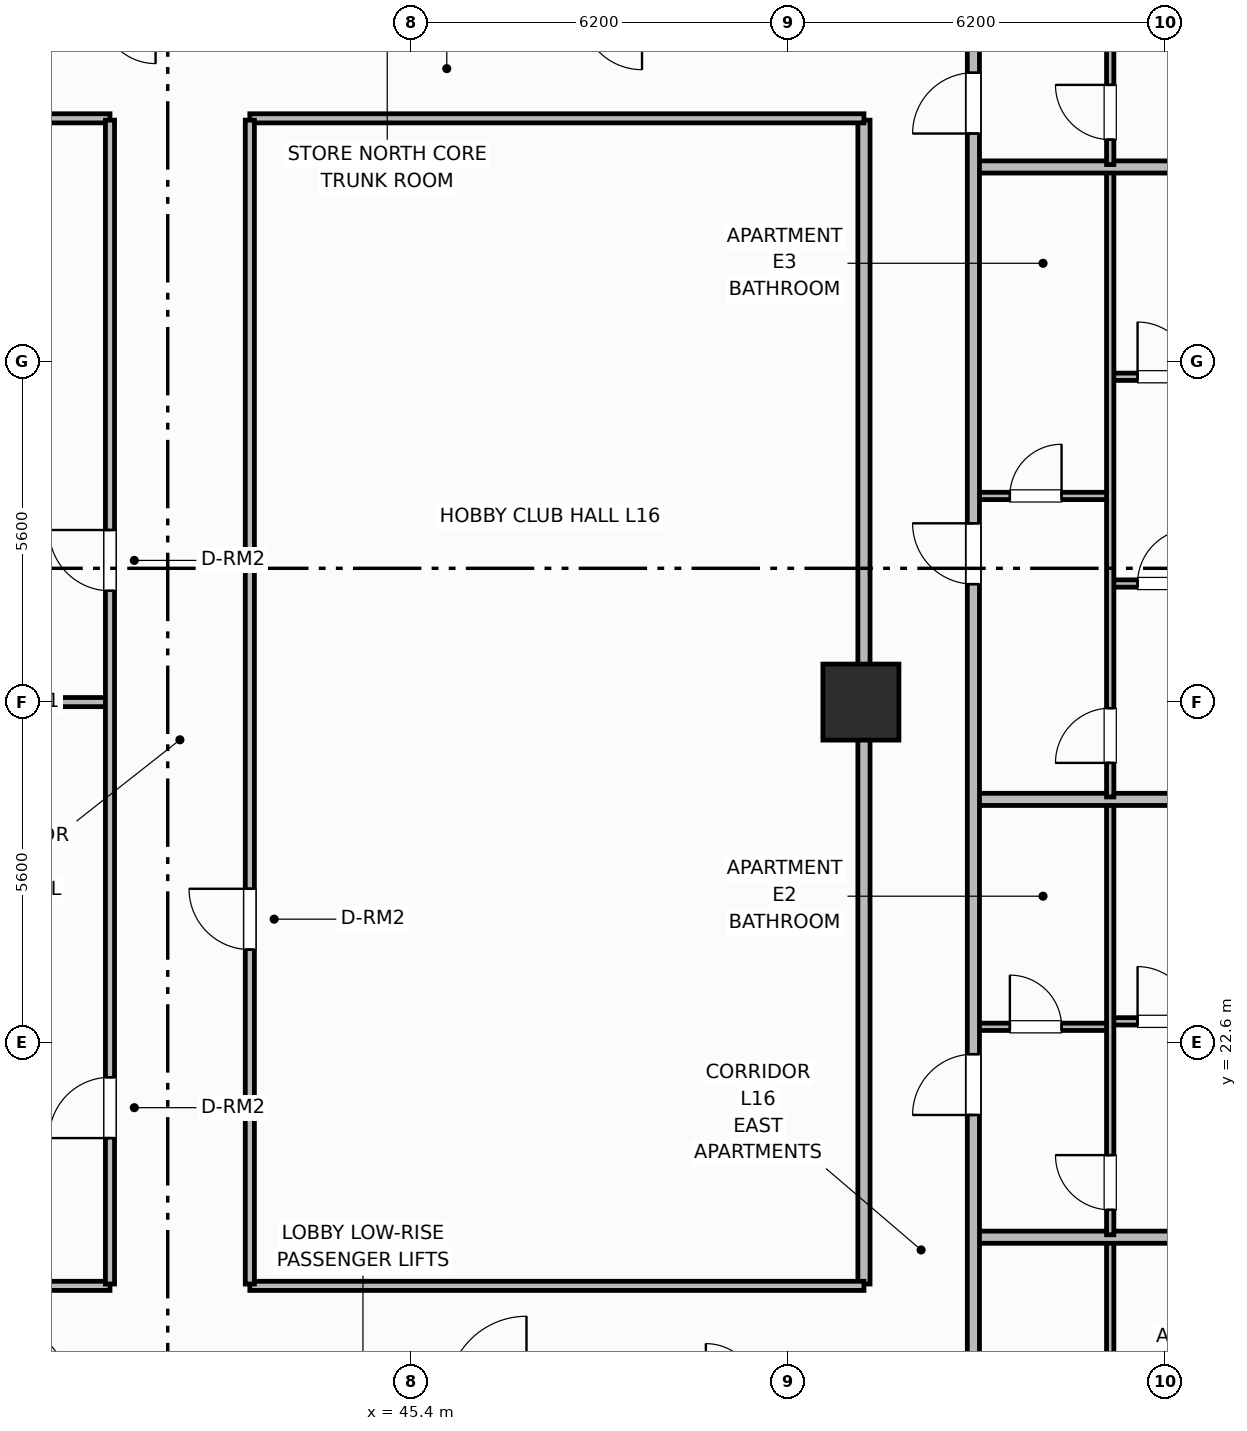
"""IFC4 building model, lengths in metres.
Left out: names, types, materials, properties, quantities, classifications, styles, units other than length and angle.
Written with IfcOpenShell. Run it as: python <this file> out.ifc"""

import sys

from ifc_helpers import new_model, si_unit, direction, frame, frame_2d, origin, origin_2d, place, context, subcontext, project, spatial, rectangle, extrude, element, fill, save


model = new_model("IFC4")
c1 = context("Model", 3, precision=1e-05, world=origin(), true_north=direction((0.0, 1.0)))
c2 = subcontext(c1, "Body", "Model", "MODEL_VIEW")
j1 = project(units=[si_unit("LENGTHUNIT", "METRE"), si_unit("PLANEANGLEUNIT", "RADIAN")], contexts=[c1])
p1 = place(None, origin())
s1 = spatial("IfcSite", under=j1, at=p1, CompositionType="ELEMENT")
p2 = place(p1, origin())
s2 = spatial("IfcBuilding", under=s1, at=p2, CompositionType="ELEMENT")
p3 = place(p2, frame((0.0, 0.0, 65.8)))
s3 = spatial("IfcBuildingStorey", under=s2, at=p3, CompositionType="ELEMENT", Elevation=65.8)
p4 = place(p3, frame((52.8, 28.2, 0.0), z_axis=(0.0, 0.0, 1.0), x_axis=(1.0, 0.0, 0.0)))
e1 = element("IfcColumn", 1, at=p4, inside=s3, PredefinedType="COLUMN", context=c2, shape_type="SweptSolid", body=[
    extrude(rectangle(XDim=1.25, YDim=1.25, at=origin_2d()), origin(), (0.0, 0.0, 1.0), 3.7),
])
p5 = place(p3, frame((52.85, 18.63, 0.0), z_axis=(0.0, 0.0, 1.0), x_axis=(0.0, 1.0, 0.0)))
e2 = element("IfcWall", 2, at=p5, inside=s3, PredefinedType="PARTITIONING", context=c2, shape_type="SweptSolid", body=[
    extrude(rectangle(XDim=19.14, YDim=0.2, at=frame_2d((9.57, 0.0))), origin(), (0.0, 0.0, 1.0), 2.53),
])
p6 = place(p3, frame((25.55, 18.6, 0.0), z_axis=(0.0, 0.0, 1.0), x_axis=(1.0, 0.0, 0.0)))
e3 = element("IfcWall", 3, at=p6, inside=s3, PredefinedType="PARTITIONING", context=c2, shape_type="SweptSolid", body=[
    extrude(rectangle(XDim=14.9, YDim=0.15, at=frame_2d((7.45, 0.0))), origin(), (0.0, 0.0, 1.0), 2.53),
])
p7 = place(p3, frame((42.75, 18.6, 0.0), z_axis=(0.0, 0.0, 1.0), x_axis=(1.0, 0.0, 0.0)))
e4 = element("IfcWall", 4, at=p7, inside=s3, PredefinedType="PARTITIONING", context=c2, shape_type="SweptSolid", body=[
    extrude(rectangle(XDim=10.1, YDim=0.15, at=frame_2d((5.05, 0.0))), origin(), (0.0, 0.0, 1.0), 2.53),
])
p8 = place(p3, frame((25.55, 37.8, 0.0), z_axis=(0.0, 0.0, 1.0), x_axis=(1.0, 0.0, 0.0)))
e5 = element("IfcWall", 5, at=p8, inside=s3, PredefinedType="PARTITIONING", context=c2, shape_type="SweptSolid", body=[
    extrude(rectangle(XDim=14.9, YDim=0.15, at=frame_2d((7.45, 0.0))), origin(), (0.0, 0.0, 1.0), 2.53),
])
p9 = place(p3, frame((42.75, 37.8, 0.0), z_axis=(0.0, 0.0, 1.0), x_axis=(1.0, 0.0, 0.0)))
e6 = element("IfcWall", 6, at=p9, inside=s3, PredefinedType="PARTITIONING", context=c2, shape_type="SweptSolid", body=[
    extrude(rectangle(XDim=10.1, YDim=0.15, at=frame_2d((5.05, 0.0))), origin(), (0.0, 0.0, 1.0), 2.53),
])
p10 = place(p3, frame((25.6, 28.2, 0.0), z_axis=(0.0, 0.0, 1.0), x_axis=(1.0, 0.0, 0.0)))
e7 = element("IfcWall", 7, at=p10, inside=s3, PredefinedType="PARTITIONING", context=c2, shape_type="SweptSolid", body=[
    extrude(rectangle(XDim=14.87, YDim=0.15, at=frame_2d((7.435, 0.0))), origin(), (0.0, 0.0, 1.0), 2.53),
])
p11 = place(p3, frame((40.45, 18.63, 0.0), z_axis=(0.0, 0.0, 1.0), x_axis=(0.0, 1.0, 0.0)))
e8 = element("IfcWall", 8, at=p11, inside=s3, PredefinedType="PARTITIONING", context=c2, shape_type="SweptSolid", body=[
    extrude(rectangle(XDim=19.14, YDim=0.15, at=frame_2d((9.57, 0.0))), origin(), (0.0, 0.0, 1.0), 2.53),
])
p12 = place(p11, frame((2.4, 0.0, 0.0)))
e9 = element("IfcOpeningElement", 9, at=p12, cuts=e8, PredefinedType="OPENING", context=c2, shape_type="SweptSolid", body=[
    extrude(rectangle(XDim=1.0, YDim=2.15, at=frame_2d((0.5, 1.075))), frame((0.0, 0.085, 0.0), z_axis=(0.0, -1.0, 0.0), x_axis=(1.0, 0.0, 0.0)), (0.0, 0.0, 1.0), 0.17),
])
p13 = place(p11, frame((11.4, 0.0, 0.0)))
e10 = element("IfcOpeningElement", 10, at=p13, cuts=e8, PredefinedType="OPENING", context=c2, shape_type="SweptSolid", body=[
    extrude(rectangle(XDim=1.0, YDim=2.15, at=frame_2d((0.5, 1.075))), frame((0.0, 0.085, 0.0), z_axis=(0.0, -1.0, 0.0), x_axis=(1.0, 0.0, 0.0)), (0.0, 0.0, 1.0), 0.17),
])
p14 = place(p3, frame((42.75, 18.63, 0.0), z_axis=(0.0, 0.0, 1.0), x_axis=(0.0, 1.0, 0.0)))
e11 = element("IfcWall", 11, at=p14, inside=s3, PredefinedType="PARTITIONING", context=c2, shape_type="SweptSolid", body=[
    extrude(rectangle(XDim=19.14, YDim=0.15, at=frame_2d((9.57, 0.0))), origin(), (0.0, 0.0, 1.0), 2.53),
])
p15 = place(p14, frame((5.5, 0.0, 0.0)))
e12 = element("IfcOpeningElement", 12, at=p15, cuts=e11, PredefinedType="OPENING", context=c2, shape_type="SweptSolid", body=[
    extrude(rectangle(XDim=1.0, YDim=2.15, at=frame_2d((0.5, 1.075))), frame((0.0, 0.085, 0.0), z_axis=(0.0, -1.0, 0.0), x_axis=(1.0, 0.0, 0.0)), (0.0, 0.0, 1.0), 0.17),
])
p16 = place(p3, frame((56.9, 10.64, 0.0), z_axis=(0.0, 0.0, 1.0), x_axis=(0.0, 1.0, 0.0)))
e13 = element("IfcWall", 13, at=p16, inside=s3, PredefinedType="PARTITIONING", context=c2, shape_type="SweptSolid", body=[
    extrude(rectangle(XDim=8.72, YDim=0.12, at=frame_2d((4.36, 0.0))), origin(), (0.0, 0.0, 1.0), 2.53),
])
p17 = place(p16, frame((0.41, 0.0, 0.0)))
e14 = element("IfcOpeningElement", 14, at=p17, cuts=e13, PredefinedType="OPENING", context=c2, shape_type="SweptSolid", body=[
    extrude(rectangle(XDim=0.9, YDim=2.1, at=frame_2d((0.45, 1.05))), frame((0.0, 0.07, 0.0), z_axis=(0.0, -1.0, 0.0), x_axis=(1.0, 0.0, 0.0)), (0.0, 0.0, 1.0), 0.14),
])
p18 = place(p3, frame((54.65, 19.4, 0.0), z_axis=(0.0, 0.0, 1.0), x_axis=(1.0, 0.0, 0.0)))
e15 = element("IfcWall", 15, at=p18, inside=s3, PredefinedType="PARTITIONING", context=c2, shape_type="SweptSolid", body=[
    extrude(rectangle(XDim=9.18, YDim=0.2, at=frame_2d((4.59, 0.0))), origin(), (0.0, 0.0, 1.0), 2.53),
])
p19 = place(p3, frame((54.65, 22.86, 0.0), z_axis=(0.0, 0.0, 1.0), x_axis=(1.0, 0.0, 0.0)))
e16 = element("IfcWall", 16, at=p19, inside=s3, PredefinedType="PARTITIONING", context=c2, shape_type="SweptSolid", body=[
    extrude(rectangle(XDim=2.25, YDim=0.12, at=frame_2d((1.125, 0.0))), origin(), (0.0, 0.0, 1.0), 2.53),
])
p20 = place(p19, frame((0.6, 0.0, 0.0)))
e17 = element("IfcOpeningElement", 17, at=p20, cuts=e16, PredefinedType="OPENING", context=c2, shape_type="SweptSolid", body=[
    extrude(rectangle(XDim=0.85, YDim=2.1, at=frame_2d((0.425, 1.05))), frame((0.0, 0.07, 0.0), z_axis=(0.0, -1.0, 0.0), x_axis=(1.0, 0.0, 0.0)), (0.0, 0.0, 1.0), 0.14),
])
p21 = place(p3, frame((56.9, 22.95, 0.0), z_axis=(0.0, 0.0, 1.0), x_axis=(1.0, 0.0, 0.0)))
e18 = element("IfcWall", 18, at=p21, inside=s3, PredefinedType="PARTITIONING", context=c2, shape_type="SweptSolid", body=[
    extrude(rectangle(XDim=6.93, YDim=0.12, at=frame_2d((3.465, 0.0))), origin(), (0.0, 0.0, 1.0), 2.53),
])
p22 = place(p21, frame((0.45, 0.0, 0.0)))
e19 = element("IfcOpeningElement", 19, at=p22, cuts=e18, PredefinedType="OPENING", context=c2, shape_type="SweptSolid", body=[
    extrude(rectangle(XDim=0.9, YDim=2.1, at=frame_2d((0.45, 1.05))), frame((0.0, 0.07, 0.0), z_axis=(0.0, -1.0, 0.0), x_axis=(1.0, 0.0, 0.0)), (0.0, 0.0, 1.0), 0.14),
])
p23 = place(p3, frame((56.9, 19.44, 0.0), z_axis=(0.0, 0.0, 1.0), x_axis=(0.0, 1.0, 0.0)))
e20 = element("IfcWall", 20, at=p23, inside=s3, PredefinedType="PARTITIONING", context=c2, shape_type="SweptSolid", body=[
    extrude(rectangle(XDim=7.12, YDim=0.12, at=frame_2d((3.56, 0.0))), origin(), (0.0, 0.0, 1.0), 2.53),
])
p24 = place(p23, frame((0.41, 0.0, 0.0)))
e21 = element("IfcOpeningElement", 21, at=p24, cuts=e20, PredefinedType="OPENING", context=c2, shape_type="SweptSolid", body=[
    extrude(rectangle(XDim=0.9, YDim=2.1, at=frame_2d((0.45, 1.05))), frame((0.0, 0.07, 0.0), z_axis=(0.0, -1.0, 0.0), x_axis=(1.0, 0.0, 0.0)), (0.0, 0.0, 1.0), 0.14),
])
p25 = place(p3, frame((54.65, 26.6, 0.0), z_axis=(0.0, 0.0, 1.0), x_axis=(1.0, 0.0, 0.0)))
e22 = element("IfcWall", 22, at=p25, inside=s3, PredefinedType="PARTITIONING", context=c2, shape_type="SweptSolid", body=[
    extrude(rectangle(XDim=8.78, YDim=0.2, at=frame_2d((4.39, 0.0))), origin(), (0.0, 0.0, 1.0), 2.53),
])
p26 = place(p3, frame((54.65, 31.59, 0.0), z_axis=(0.0, 0.0, 1.0), x_axis=(1.0, 0.0, 0.0)))
e23 = element("IfcWall", 23, at=p26, inside=s3, PredefinedType="PARTITIONING", context=c2, shape_type="SweptSolid", body=[
    extrude(rectangle(XDim=2.25, YDim=0.12, at=frame_2d((1.125, 0.0))), origin(), (0.0, 0.0, 1.0), 2.53),
])
p27 = place(p26, frame((0.6, 0.0, 0.0)))
e24 = element("IfcOpeningElement", 24, at=p27, cuts=e23, PredefinedType="OPENING", context=c2, shape_type="SweptSolid", body=[
    extrude(rectangle(XDim=0.85, YDim=2.1, at=frame_2d((0.425, 1.05))), frame((0.0, 0.07, 0.0), z_axis=(0.0, -1.0, 0.0), x_axis=(1.0, 0.0, 0.0)), (0.0, 0.0, 1.0), 0.14),
])
p28 = place(p3, frame((56.9, 30.15, 0.0), z_axis=(0.0, 0.0, 1.0), x_axis=(1.0, 0.0, 0.0)))
e25 = element("IfcWall", 25, at=p28, inside=s3, PredefinedType="PARTITIONING", context=c2, shape_type="SweptSolid", body=[
    extrude(rectangle(XDim=6.355, YDim=0.12, at=frame_2d((3.177, 0.0))), origin(), (0.0, 0.0, 1.0), 2.53),
])
p29 = place(p28, frame((0.45, 0.0, 0.0)))
e26 = element("IfcOpeningElement", 26, at=p29, cuts=e25, PredefinedType="OPENING", context=c2, shape_type="SweptSolid", body=[
    extrude(rectangle(XDim=0.9, YDim=2.1, at=frame_2d((0.45, 1.05))), frame((0.0, 0.07, 0.0), z_axis=(0.0, -1.0, 0.0), x_axis=(1.0, 0.0, 0.0)), (0.0, 0.0, 1.0), 0.14),
])
p30 = place(p3, frame((56.9, 33.55, 0.0), z_axis=(0.0, 0.0, 1.0), x_axis=(1.0, 0.0, 0.0)))
e27 = element("IfcWall", 27, at=p30, inside=s3, PredefinedType="PARTITIONING", context=c2, shape_type="SweptSolid", body=[
    extrude(rectangle(XDim=6.93, YDim=0.12, at=frame_2d((3.465, 0.0))), origin(), (0.0, 0.0, 1.0), 2.53),
])
p31 = place(p30, frame((0.45, 0.0, 0.0)))
e28 = element("IfcOpeningElement", 28, at=p31, cuts=e27, PredefinedType="OPENING", context=c2, shape_type="SweptSolid", body=[
    extrude(rectangle(XDim=0.9, YDim=2.1, at=frame_2d((0.45, 1.05))), frame((0.0, 0.07, 0.0), z_axis=(0.0, -1.0, 0.0), x_axis=(1.0, 0.0, 0.0)), (0.0, 0.0, 1.0), 0.14),
])
p32 = place(p3, frame((56.9, 26.64, 0.0), z_axis=(0.0, 0.0, 1.0), x_axis=(0.0, 1.0, 0.0)))
e29 = element("IfcWall", 29, at=p32, inside=s3, PredefinedType="PARTITIONING", context=c2, shape_type="SweptSolid", body=[
    extrude(rectangle(XDim=10.32, YDim=0.12, at=frame_2d((5.16, 0.0))), origin(), (0.0, 0.0, 1.0), 2.53),
])
p33 = place(p32, frame((0.56, 0.0, 0.0)))
e30 = element("IfcOpeningElement", 30, at=p33, cuts=e29, PredefinedType="OPENING", context=c2, shape_type="SweptSolid", body=[
    extrude(rectangle(XDim=0.9, YDim=2.1, at=frame_2d((0.45, 1.05))), frame((0.0, 0.07, 0.0), z_axis=(0.0, -1.0, 0.0), x_axis=(1.0, 0.0, 0.0)), (0.0, 0.0, 1.0), 0.14),
])
p34 = place(p3, frame((54.65, 37.0, 0.0), z_axis=(0.0, 0.0, 1.0), x_axis=(1.0, 0.0, 0.0)))
e31 = element("IfcWall", 31, at=p34, inside=s3, PredefinedType="PARTITIONING", context=c2, shape_type="SweptSolid", body=[
    extrude(rectangle(XDim=9.18, YDim=0.2, at=frame_2d((4.59, 0.0))), origin(), (0.0, 0.0, 1.0), 2.53),
])
p35 = place(p3, frame((56.9, 37.04, 0.0), z_axis=(0.0, 0.0, 1.0), x_axis=(0.0, 1.0, 0.0)))
e32 = element("IfcWall", 32, at=p35, inside=s3, PredefinedType="PARTITIONING", context=c2, shape_type="SweptSolid", body=[
    extrude(rectangle(XDim=8.72, YDim=0.12, at=frame_2d((4.36, 0.0))), origin(), (0.0, 0.0, 1.0), 2.53),
])
p36 = place(p35, frame((0.41, 0.0, 0.0)))
e33 = element("IfcOpeningElement", 33, at=p36, cuts=e32, PredefinedType="OPENING", context=c2, shape_type="SweptSolid", body=[
    extrude(rectangle(XDim=0.9, YDim=2.1, at=frame_2d((0.45, 1.05))), frame((0.0, 0.07, 0.0), z_axis=(0.0, -1.0, 0.0), x_axis=(1.0, 0.0, 0.0)), (0.0, 0.0, 1.0), 0.14),
])
p37 = place(p3, frame((54.65, 10.6, 0.0), z_axis=(0.0, 0.0, 1.0), x_axis=(0.0, 1.0, 0.0)))
e34 = element("IfcWall", 34, at=p37, inside=s3, PredefinedType="PARTITIONING", context=c2, shape_type="SweptSolid", body=[
    extrude(rectangle(XDim=35.2, YDim=0.2, at=frame_2d((17.6, 0.0))), origin(), (0.0, 0.0, 1.0), 2.53),
])
p38 = place(p37, frame((2.65, 0.0, 0.0)))
e35 = element("IfcOpeningElement", 35, at=p38, cuts=e34, PredefinedType="OPENING", context=c2, shape_type="SweptSolid", body=[
    extrude(rectangle(XDim=1.0, YDim=2.15, at=frame_2d((0.5, 1.075))), frame((0.0, 0.11, 0.0), z_axis=(0.0, -1.0, 0.0), x_axis=(1.0, 0.0, 0.0)), (0.0, 0.0, 1.0), 0.22),
])
p39 = place(p37, frame((10.81, 0.0, 0.0)))
e36 = element("IfcOpeningElement", 36, at=p39, cuts=e34, PredefinedType="OPENING", context=c2, shape_type="SweptSolid", body=[
    extrude(rectangle(XDim=1.0, YDim=2.15, at=frame_2d((0.5, 1.075))), frame((0.0, 0.11, 0.0), z_axis=(0.0, -1.0, 0.0), x_axis=(1.0, 0.0, 0.0)), (0.0, 0.0, 1.0), 0.22),
])
p40 = place(p37, frame((19.54, 0.0, 0.0)))
e37 = element("IfcOpeningElement", 37, at=p40, cuts=e34, PredefinedType="OPENING", context=c2, shape_type="SweptSolid", body=[
    extrude(rectangle(XDim=1.0, YDim=2.15, at=frame_2d((0.5, 1.075))), frame((0.0, 0.11, 0.0), z_axis=(0.0, -1.0, 0.0), x_axis=(1.0, 0.0, 0.0)), (0.0, 0.0, 1.0), 0.22),
])
p41 = place(p37, frame((26.95, 0.0, 0.0)))
e38 = element("IfcOpeningElement", 38, at=p41, cuts=e34, PredefinedType="OPENING", context=c2, shape_type="SweptSolid", body=[
    extrude(rectangle(XDim=1.0, YDim=2.15, at=frame_2d((0.5, 1.075))), frame((0.0, 0.11, 0.0), z_axis=(0.0, -1.0, 0.0), x_axis=(1.0, 0.0, 0.0)), (0.0, 0.0, 1.0), 0.22),
])
p42 = place(p12, origin())
e39 = element("IfcDoor", 39, at=p42, inside=s3, OperationType="SINGLE_SWING_LEFT", PredefinedType="DOOR", context=c2, shape_type="SweptSolid", body=[
    extrude(rectangle(XDim=1.0, YDim=2.15, at=frame_2d((0.5, 1.075))), frame((0.0, 0.025, 0.0), z_axis=(0.0, -1.0, 0.0), x_axis=(1.0, 0.0, 0.0)), (0.0, 0.0, 1.0), 0.05),
])
fill(e9, e39)
p43 = place(p13, origin())
e40 = element("IfcDoor", 40, at=p43, inside=s3, OperationType="SINGLE_SWING_RIGHT", PredefinedType="DOOR", context=c2, shape_type="SweptSolid", body=[
    extrude(rectangle(XDim=1.0, YDim=2.15, at=frame_2d((0.5, 1.075))), frame((0.0, 0.025, 0.0), z_axis=(0.0, -1.0, 0.0), x_axis=(1.0, 0.0, 0.0)), (0.0, 0.0, 1.0), 0.05),
])
fill(e10, e40)
p44 = place(p15, origin())
e41 = element("IfcDoor", 41, at=p44, inside=s3, OperationType="SINGLE_SWING_RIGHT", PredefinedType="DOOR", context=c2, shape_type="SweptSolid", body=[
    extrude(rectangle(XDim=1.0, YDim=2.15, at=frame_2d((0.5, 1.075))), frame((0.0, 0.025, 0.0), z_axis=(0.0, -1.0, 0.0), x_axis=(1.0, 0.0, 0.0)), (0.0, 0.0, 1.0), 0.05),
])
fill(e12, e41)
p45 = place(p20, origin())
e42 = element("IfcDoor", 42, at=p45, inside=s3, OperationType="SINGLE_SWING_LEFT", PredefinedType="DOOR", context=c2, shape_type="SweptSolid", body=[
    extrude(rectangle(XDim=0.85, YDim=2.1, at=frame_2d((0.425, 1.05))), frame((0.0, 0.025, 0.0), z_axis=(0.0, -1.0, 0.0), x_axis=(1.0, 0.0, 0.0)), (0.0, 0.0, 1.0), 0.05),
])
fill(e17, e42)
p46 = place(p22, origin())
e43 = element("IfcDoor", 43, at=p46, inside=s3, OperationType="SINGLE_SWING_LEFT", PredefinedType="DOOR", context=c2, shape_type="SweptSolid", body=[
    extrude(rectangle(XDim=0.9, YDim=2.1, at=frame_2d((0.45, 1.05))), frame((0.0, 0.025, 0.0), z_axis=(0.0, -1.0, 0.0), x_axis=(1.0, 0.0, 0.0)), (0.0, 0.0, 1.0), 0.05),
])
fill(e19, e43)
p47 = place(p24, origin())
e44 = element("IfcDoor", 44, at=p47, inside=s3, OperationType="SINGLE_SWING_RIGHT", PredefinedType="DOOR", context=c2, shape_type="SweptSolid", body=[
    extrude(rectangle(XDim=0.9, YDim=2.1, at=frame_2d((0.45, 1.05))), frame((0.0, 0.025, 0.0), z_axis=(0.0, -1.0, 0.0), x_axis=(1.0, 0.0, 0.0)), (0.0, 0.0, 1.0), 0.05),
])
fill(e21, e44)
p48 = place(p27, origin())
e45 = element("IfcDoor", 45, at=p48, inside=s3, OperationType="SINGLE_SWING_RIGHT", PredefinedType="DOOR", context=c2, shape_type="SweptSolid", body=[
    extrude(rectangle(XDim=0.85, YDim=2.1, at=frame_2d((0.425, 1.05))), frame((0.0, 0.025, 0.0), z_axis=(0.0, -1.0, 0.0), x_axis=(1.0, 0.0, 0.0)), (0.0, 0.0, 1.0), 0.05),
])
fill(e24, e45)
p49 = place(p29, origin())
e46 = element("IfcDoor", 46, at=p49, inside=s3, OperationType="SINGLE_SWING_RIGHT", PredefinedType="DOOR", context=c2, shape_type="SweptSolid", body=[
    extrude(rectangle(XDim=0.9, YDim=2.1, at=frame_2d((0.45, 1.05))), frame((0.0, 0.025, 0.0), z_axis=(0.0, -1.0, 0.0), x_axis=(1.0, 0.0, 0.0)), (0.0, 0.0, 1.0), 0.05),
])
fill(e26, e46)
p50 = place(p31, origin())
e47 = element("IfcDoor", 47, at=p50, inside=s3, OperationType="SINGLE_SWING_LEFT", PredefinedType="DOOR", context=c2, shape_type="SweptSolid", body=[
    extrude(rectangle(XDim=0.9, YDim=2.1, at=frame_2d((0.45, 1.05))), frame((0.0, 0.025, 0.0), z_axis=(0.0, -1.0, 0.0), x_axis=(1.0, 0.0, 0.0)), (0.0, 0.0, 1.0), 0.05),
])
fill(e28, e47)
p51 = place(p33, origin())
e48 = element("IfcDoor", 48, at=p51, inside=s3, OperationType="SINGLE_SWING_LEFT", PredefinedType="DOOR", context=c2, shape_type="SweptSolid", body=[
    extrude(rectangle(XDim=0.9, YDim=2.1, at=frame_2d((0.45, 1.05))), frame((0.0, 0.025, 0.0), z_axis=(0.0, -1.0, 0.0), x_axis=(1.0, 0.0, 0.0)), (0.0, 0.0, 1.0), 0.05),
])
fill(e30, e48)
p52 = place(p36, origin())
e49 = element("IfcDoor", 49, at=p52, inside=s3, OperationType="SINGLE_SWING_RIGHT", PredefinedType="DOOR", context=c2, shape_type="SweptSolid", body=[
    extrude(rectangle(XDim=0.9, YDim=2.1, at=frame_2d((0.45, 1.05))), frame((0.0, 0.025, 0.0), z_axis=(0.0, -1.0, 0.0), x_axis=(1.0, 0.0, 0.0)), (0.0, 0.0, 1.0), 0.05),
])
fill(e33, e49)
p53 = place(p39, origin())
e50 = element("IfcDoor", 50, at=p53, inside=s3, OperationType="SINGLE_SWING_LEFT", PredefinedType="DOOR", context=c2, shape_type="SweptSolid", body=[
    extrude(rectangle(XDim=1.0, YDim=2.15, at=frame_2d((0.5, 1.075))), frame((0.0, 0.025, 0.0), z_axis=(0.0, -1.0, 0.0), x_axis=(1.0, 0.0, 0.0)), (0.0, 0.0, 1.0), 0.05),
])
fill(e36, e50)
p54 = place(p40, origin())
e51 = element("IfcDoor", 51, at=p54, inside=s3, OperationType="SINGLE_SWING_RIGHT", PredefinedType="DOOR", context=c2, shape_type="SweptSolid", body=[
    extrude(rectangle(XDim=1.0, YDim=2.15, at=frame_2d((0.5, 1.075))), frame((0.0, 0.025, 0.0), z_axis=(0.0, -1.0, 0.0), x_axis=(1.0, 0.0, 0.0)), (0.0, 0.0, 1.0), 0.05),
])
fill(e37, e51)
p55 = place(p41, origin())
e52 = element("IfcDoor", 52, at=p55, inside=s3, OperationType="SINGLE_SWING_LEFT", PredefinedType="DOOR", context=c2, shape_type="SweptSolid", body=[
    extrude(rectangle(XDim=1.0, YDim=2.15, at=frame_2d((0.5, 1.075))), frame((0.0, 0.025, 0.0), z_axis=(0.0, -1.0, 0.0), x_axis=(1.0, 0.0, 0.0)), (0.0, 0.0, 1.0), 0.05),
])
fill(e38, e52)
save(model, sys.argv[1])
